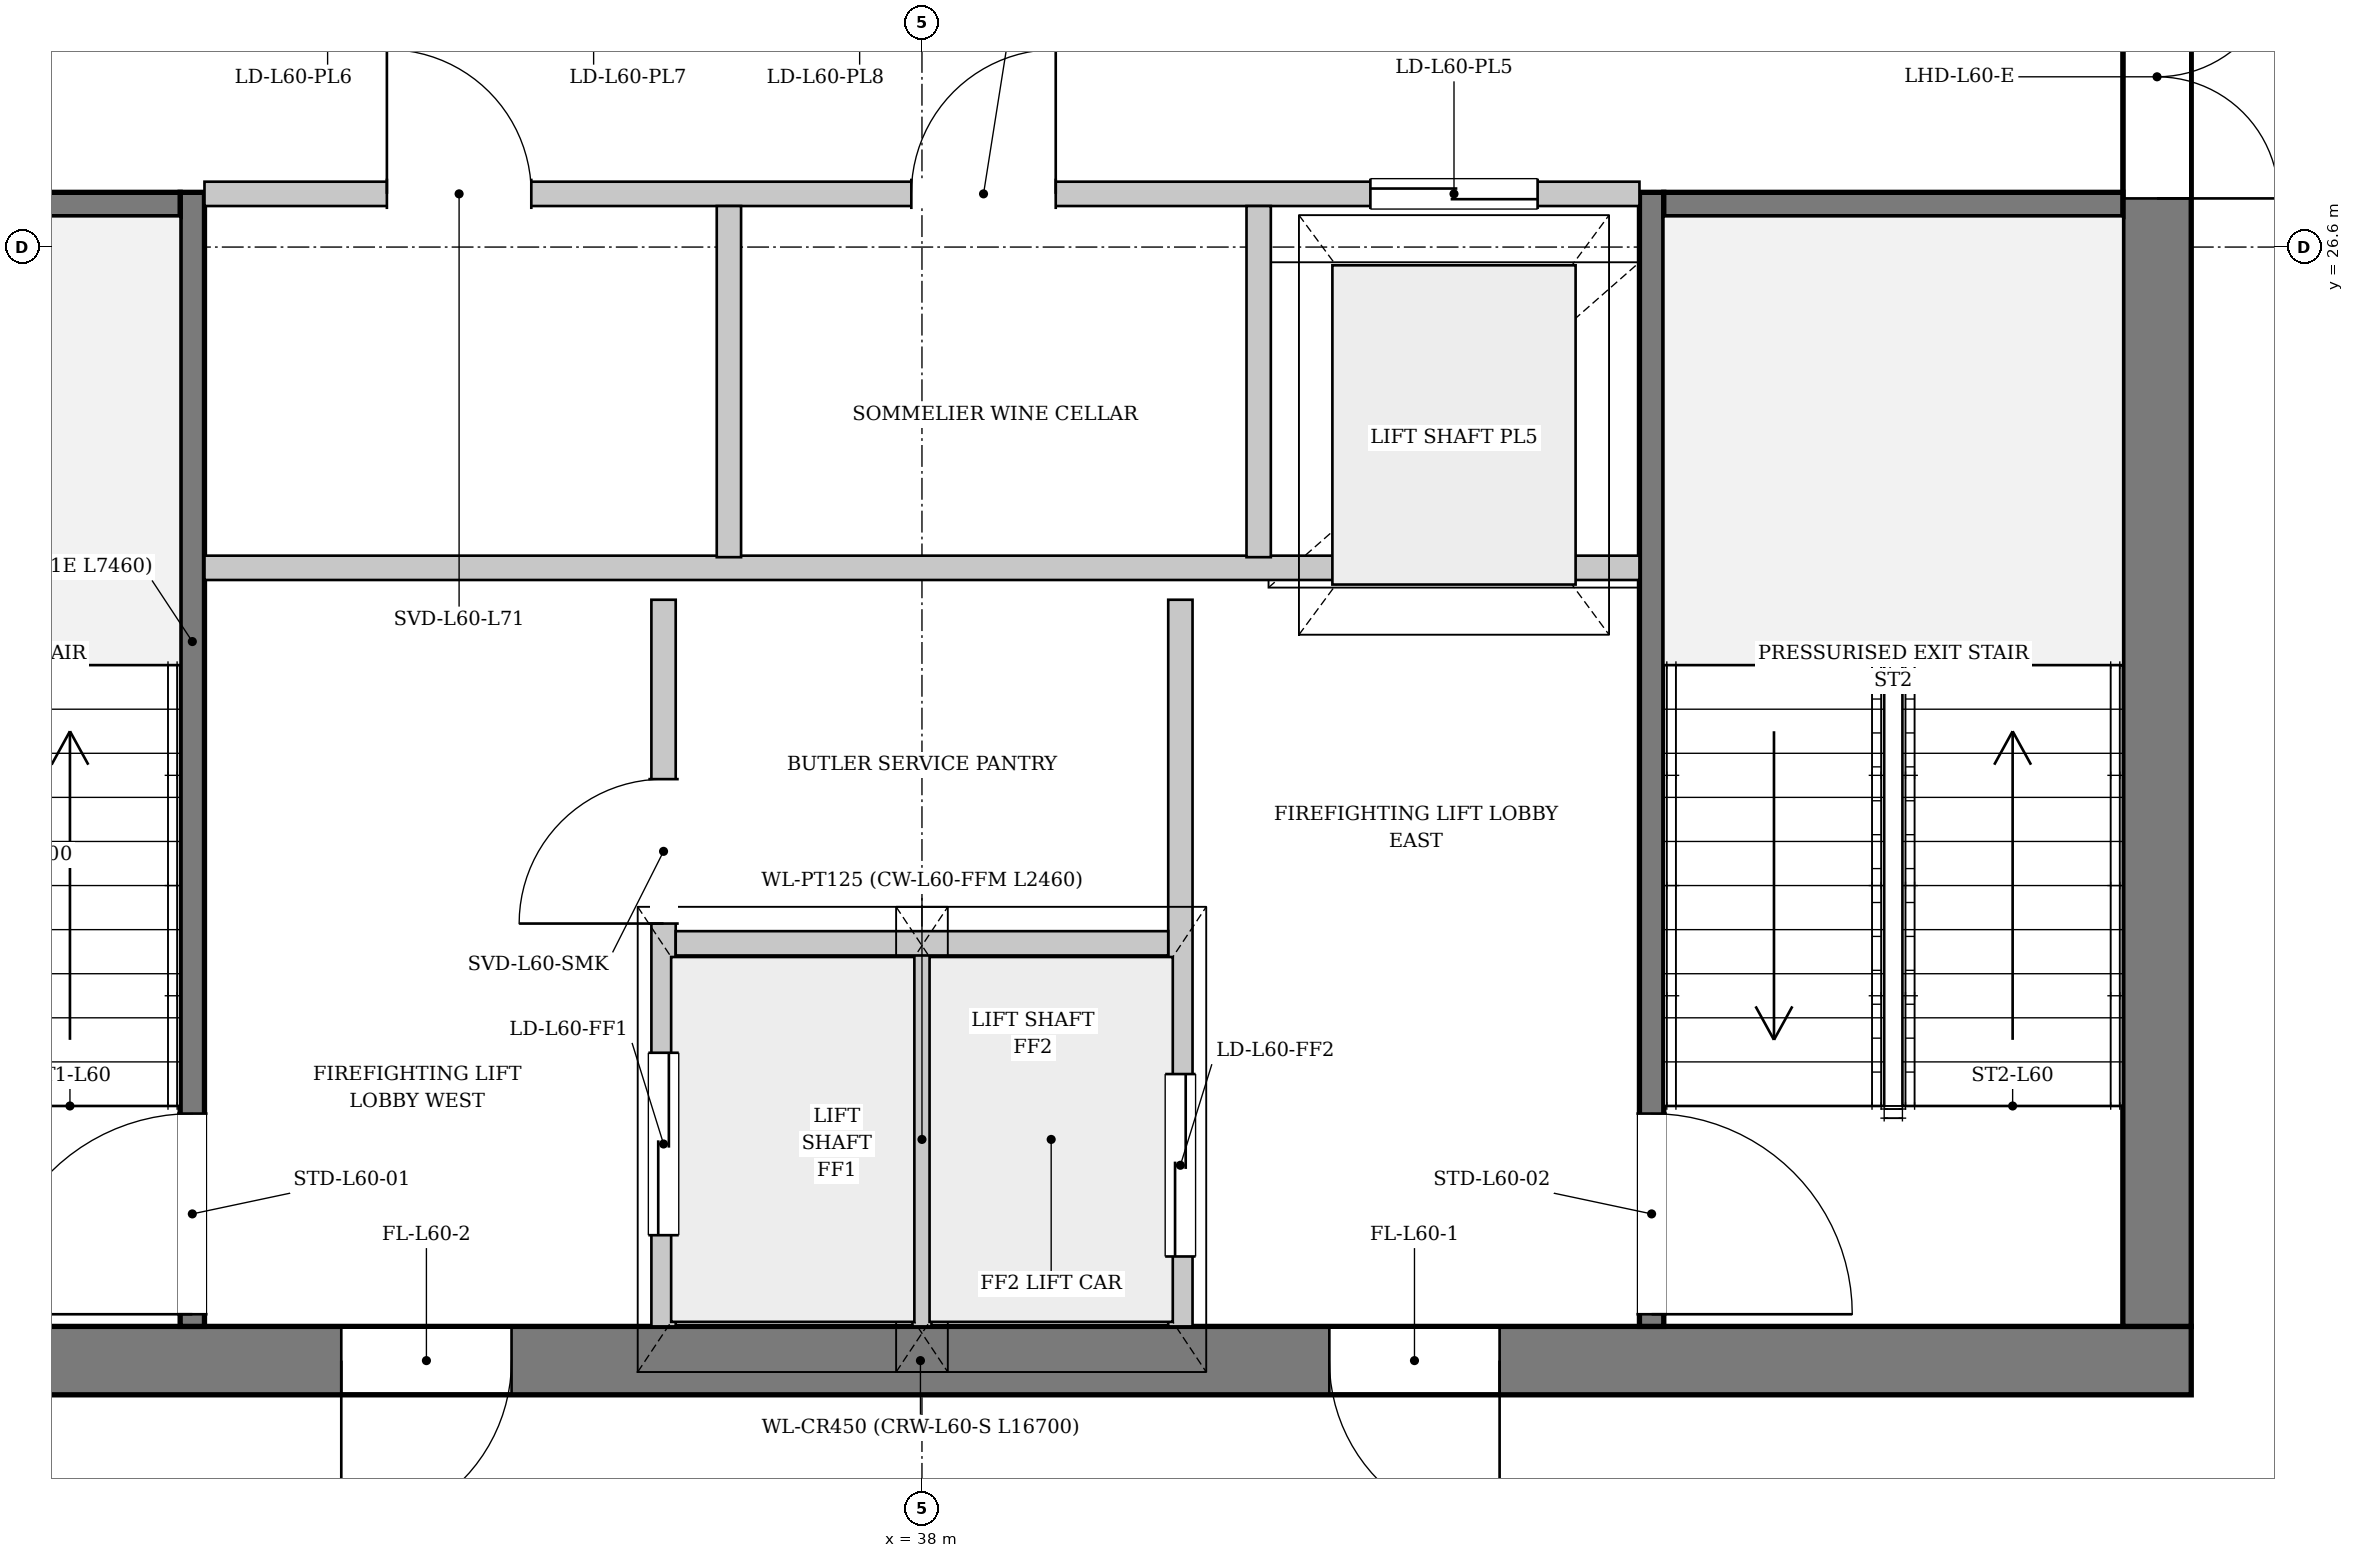
"""IFC4 building model, lengths in metres.
Left out: names, types, materials, properties, quantities, classifications, styles, units other than length and angle.
Written with IfcOpenShell. Run it as: python <this file> out.ifc"""

import sys

from ifc_helpers import new_model, si_unit, direction, frame, frame_2d, origin, place, context, subcontext, project, spatial, rectangle, extrude, source, transform, mapped, element, fill, save


model = new_model("IFC4")
c1 = context("Model", 3, precision=1e-05, world=origin(), true_north=direction((0.0, 1.0)))
c2 = subcontext(c1, "Body", "Model", "MODEL_VIEW")
j1 = project(units=[si_unit("LENGTHUNIT", "METRE"), si_unit("PLANEANGLEUNIT", "RADIAN")], contexts=[c1])
p1 = place(None, origin())
s1 = spatial("IfcSite", under=j1, at=p1, CompositionType="ELEMENT")
p2 = place(p1, origin())
s2 = spatial("IfcBuilding", under=s1, at=p2, CompositionType="ELEMENT")
p3 = place(p2, frame((0.0, 0.0, 227.35)))
s3 = spatial("IfcBuildingStorey", under=s2, at=p3, CompositionType="ELEMENT", Elevation=227.35)
p4 = place(p3, frame((52.76, 24.451, 0.0), z_axis=(0.0, 0.0, 1.0), x_axis=(-0.419378553641, -0.907811449997, 0.0)))
e1 = element("IfcWall", 1, at=p4, inside=s3, PredefinedType="SOLIDWALL", context=c2, shape_type="SweptSolid", body=[
    extrude(rectangle(XDim=22.952, YDim=0.32, at=frame_2d((11.476, 0.0))), origin(), (0.0, 0.0, 1.0), 2.822),
])
p5 = place(p4, frame((6.795, 0.0, 0.0)))
e2 = element("IfcOpeningElement", 2, at=p5, cuts=e1, PredefinedType="OPENING", context=c2, shape_type="SweptSolid", body=[
    extrude(rectangle(XDim=1.5, YDim=2.3, at=frame_2d((0.75, 1.15))), frame((0.0, 0.17, 0.0), z_axis=(0.0, -1.0, 0.0), x_axis=(1.0, 0.0, 0.0)), (0.0, 0.0, 1.0), 0.34),
])
p6 = place(p4, frame((17.285, 0.0, 0.352)))
e3 = element("IfcOpeningElement", 3, at=p6, cuts=e1, PredefinedType="OPENING", context=c2, shape_type="SweptSolid", body=[
    extrude(rectangle(XDim=2.6, YDim=2.35, at=frame_2d((1.3, 1.175))), frame((0.0, 0.17, 0.0), z_axis=(0.0, -1.0, 0.0), x_axis=(1.0, 0.0, 0.0)), (0.0, 0.0, 1.0), 0.34),
])
p7 = place(p3, frame((44.308, 3.919, 0.0), z_axis=(0.0, 0.0, 1.0), x_axis=(0.41441444949, 0.910088272671, 0.0)))
e4 = element("IfcWall", 4, at=p7, inside=s3, PredefinedType="PARAPET", context=c2, shape_type="SweptSolid", body=[
    extrude(rectangle(XDim=20.451, YDim=0.22, at=frame_2d((10.226, 0.0))), origin(), (0.0, 0.0, 1.0), 0.3),
])
p8 = place(p3, frame((46.35, 19.275, 0.0), z_axis=(0.0, 0.0, 1.0), x_axis=(-1.0, 0.0, 0.0)))
e5 = element("IfcWall", 5, at=p8, inside=s3, PredefinedType="SHEAR", context=c2, shape_type="SweptSolid", body=[
    extrude(rectangle(XDim=16.7, YDim=0.45, at=frame_2d((8.35, 0.0))), origin(), (0.0, 0.0, 1.0), 3.33),
])
p9 = place(p8, frame((4.55, 0.0, 0.0)))
e6 = element("IfcOpeningElement", 6, at=p9, cuts=e5, PredefinedType="OPENING", context=c2, shape_type="SweptSolid", body=[
    extrude(rectangle(XDim=1.12, YDim=2.25, at=frame_2d((0.56, 1.125))), frame((0.0, 0.235, 0.0), z_axis=(0.0, -1.0, 0.0), x_axis=(1.0, 0.0, 0.0)), (0.0, 0.0, 1.0), 0.47),
])
p10 = place(p8, frame((11.05, 0.0, 0.0)))
e7 = element("IfcOpeningElement", 7, at=p10, cuts=e5, PredefinedType="OPENING", context=c2, shape_type="SweptSolid", body=[
    extrude(rectangle(XDim=1.12, YDim=2.25, at=frame_2d((0.56, 1.125))), frame((0.0, 0.235, 0.0), z_axis=(0.0, -1.0, 0.0), x_axis=(1.0, 0.0, 0.0)), (0.0, 0.0, 1.0), 0.47),
])
p11 = place(p3, frame((46.125, 33.7, 0.0), z_axis=(0.0, 0.0, 1.0), x_axis=(0.0, -1.0, 0.0)))
e8 = element("IfcWall", 8, at=p11, inside=s3, PredefinedType="SHEAR", context=c2, shape_type="SweptSolid", body=[
    extrude(rectangle(XDim=14.2, YDim=0.45, at=frame_2d((7.1, 0.0))), origin(), (0.0, 0.0, 1.0), 3.33),
])
p12 = place(p11, frame((5.18, 0.0, 0.0)))
e9 = element("IfcOpeningElement", 9, at=p12, cuts=e8, PredefinedType="OPENING", context=c2, shape_type="SweptSolid", body=[
    extrude(rectangle(XDim=1.6, YDim=2.2, at=frame_2d((0.8, 1.1))), frame((0.0, 0.235, 0.0), z_axis=(0.0, -1.0, 0.0), x_axis=(1.0, 0.0, 0.0)), (0.0, 0.0, 1.0), 0.47),
])
p13 = place(p11, frame((2.05, 0.0, 0.0)))
e10 = element("IfcOpeningElement", 10, at=p13, cuts=e8, PredefinedType="OPENING", context=c2, shape_type="SweptSolid", body=[
    extrude(rectangle(XDim=0.95, YDim=2.1, at=frame_2d((0.475, 1.05))), frame((0.0, 0.235, 0.0), z_axis=(0.0, -1.0, 0.0), x_axis=(1.0, 0.0, 0.0)), (0.0, 0.0, 1.0), 0.47),
])
p14 = place(p3, frame((33.2, 19.5, 0.0), z_axis=(0.0, 0.0, 1.0), x_axis=(0.0, 1.0, 0.0)))
e11 = element("IfcWall", 11, at=p14, inside=s3, PredefinedType="PARTITIONING", context=c2, shape_type="SweptSolid", body=[
    extrude(rectangle(XDim=7.46, YDim=0.16, at=frame_2d((3.73, 0.0))), origin(), (0.0, 0.0, 1.0), 3.33),
])
p15 = place(p14, frame((0.08, 0.0, 0.0)))
e12 = element("IfcOpeningElement", 12, at=p15, cuts=e11, PredefinedType="OPENING", context=c2, shape_type="SweptSolid", body=[
    extrude(rectangle(XDim=1.32, YDim=2.2, at=frame_2d((0.66, 1.1))), frame((0.0, 0.09, 0.0), z_axis=(0.0, -1.0, 0.0), x_axis=(1.0, 0.0, 0.0)), (0.0, 0.0, 1.0), 0.18),
])
p16 = place(p3, frame((30.1, 26.88, 0.0), z_axis=(0.0, 0.0, 1.0), x_axis=(1.0, 0.0, 0.0)))
e13 = element("IfcWall", 13, at=p16, inside=s3, PredefinedType="PARTITIONING", context=c2, shape_type="SweptSolid", body=[
    extrude(rectangle(XDim=3.02, YDim=0.16, at=frame_2d((1.51, 0.0))), origin(), (0.0, 0.0, 1.0), 3.33),
])
p17 = place(p3, frame((42.8, 26.96, 0.0), z_axis=(0.0, 0.0, 1.0), x_axis=(0.0, -1.0, 0.0)))
e14 = element("IfcWall", 14, at=p17, inside=s3, PredefinedType="PARTITIONING", context=c2, shape_type="SweptSolid", body=[
    extrude(rectangle(XDim=7.46, YDim=0.16, at=frame_2d((3.73, 0.0))), origin(), (0.0, 0.0, 1.0), 3.33),
])
p18 = place(p17, frame((6.06, 0.0, 0.0)))
e15 = element("IfcOpeningElement", 15, at=p18, cuts=e14, PredefinedType="OPENING", context=c2, shape_type="SweptSolid", body=[
    extrude(rectangle(XDim=1.32, YDim=2.2, at=frame_2d((0.66, 1.1))), frame((0.0, 0.09, 0.0), z_axis=(0.0, -1.0, 0.0), x_axis=(1.0, 0.0, 0.0)), (0.0, 0.0, 1.0), 0.18),
])
p19 = place(p3, frame((42.88, 26.88, 0.0), z_axis=(0.0, 0.0, 1.0), x_axis=(1.0, 0.0, 0.0)))
e16 = element("IfcWall", 16, at=p19, inside=s3, PredefinedType="PARTITIONING", context=c2, shape_type="SweptSolid", body=[
    extrude(rectangle(XDim=3.02, YDim=0.16, at=frame_2d((1.51, 0.0))), origin(), (0.0, 0.0, 1.0), 3.33),
])
p20 = place(p3, frame((36.3, 19.5, 0.0), z_axis=(0.0, 0.0, 1.0), x_axis=(0.0, 1.0, 0.0)))
e17 = element("IfcWall", 17, at=p20, inside=s3, PredefinedType="PARTITIONING", context=c2, shape_type="SweptSolid", body=[
    extrude(rectangle(XDim=4.78, YDim=0.16, at=frame_2d((2.39, 0.0))), origin(), (0.0, 0.0, 1.0), 3.33),
])
p21 = place(p20, frame((0.6, 0.0, 0.0)))
e18 = element("IfcOpeningElement", 18, at=p21, cuts=e17, PredefinedType="OPENING", context=c2, shape_type="SweptSolid", body=[
    extrude(rectangle(XDim=1.2, YDim=2.2, at=frame_2d((0.6, 1.1))), frame((0.0, 0.09, 0.0), z_axis=(0.0, -1.0, 0.0), x_axis=(1.0, 0.0, 0.0)), (0.0, 0.0, 1.0), 0.18),
])
p22 = place(p20, frame((2.65, 0.0, 0.0)))
e19 = element("IfcOpeningElement", 19, at=p22, cuts=e17, PredefinedType="OPENING", context=c2, shape_type="SweptSolid", body=[
    extrude(rectangle(XDim=0.95, YDim=2.1, at=frame_2d((0.475, 1.05))), frame((0.0, 0.09, 0.0), z_axis=(0.0, -1.0, 0.0), x_axis=(1.0, 0.0, 0.0)), (0.0, 0.0, 1.0), 0.18),
])
p23 = place(p3, frame((39.7, 24.28, 0.0), z_axis=(0.0, 0.0, 1.0), x_axis=(0.0, -1.0, 0.0)))
e20 = element("IfcWall", 20, at=p23, inside=s3, PredefinedType="PARTITIONING", context=c2, shape_type="SweptSolid", body=[
    extrude(rectangle(XDim=4.78, YDim=0.16, at=frame_2d((2.39, 0.0))), origin(), (0.0, 0.0, 1.0), 3.33),
])
p24 = place(p23, frame((3.12, 0.0, 0.0)))
e21 = element("IfcOpeningElement", 21, at=p24, cuts=e20, PredefinedType="OPENING", context=c2, shape_type="SweptSolid", body=[
    extrude(rectangle(XDim=1.2, YDim=2.2, at=frame_2d((0.6, 1.1))), frame((0.0, 0.09, 0.0), z_axis=(0.0, -1.0, 0.0), x_axis=(1.0, 0.0, 0.0)), (0.0, 0.0, 1.0), 0.18),
])
p25 = place(p3, frame((38.0, 19.5, 0.0), z_axis=(0.0, 0.0, 1.0), x_axis=(0.0, 1.0, 0.0)))
e22 = element("IfcWall", 22, at=p25, inside=s3, PredefinedType="PARTITIONING", context=c2, shape_type="SweptSolid", body=[
    extrude(rectangle(XDim=2.46, YDim=0.125, at=frame_2d((1.23, 0.0))), origin(), (0.0, 0.0, 1.0), 3.33),
])
p26 = place(p3, frame((36.38, 22.02, 0.0), z_axis=(0.0, 0.0, 1.0), x_axis=(1.0, 0.0, 0.0)))
e23 = element("IfcWall", 23, at=p26, inside=s3, PredefinedType="PARTITIONING", context=c2, shape_type="SweptSolid", body=[
    extrude(rectangle(XDim=3.24, YDim=0.16, at=frame_2d((1.62, 0.0))), origin(), (0.0, 0.0, 1.0), 3.33),
])
p27 = place(p3, frame((33.28, 24.49, 0.0), z_axis=(0.0, 0.0, 1.0), x_axis=(1.0, 0.0, 0.0)))
e24 = element("IfcWall", 24, at=p27, inside=s3, PredefinedType="PARTITIONING", context=c2, shape_type="SweptSolid", body=[
    extrude(rectangle(XDim=9.44, YDim=0.16, at=frame_2d((4.72, 0.0))), origin(), (0.0, 0.0, 1.0), 3.33),
])
p28 = place(p3, frame((33.28, 26.95, 0.0), z_axis=(0.0, 0.0, 1.0), x_axis=(1.0, 0.0, 0.0)))
e25 = element("IfcWall", 25, at=p28, inside=s3, PredefinedType="PARTITIONING", context=c2, shape_type="SweptSolid", body=[
    extrude(rectangle(XDim=9.44, YDim=0.16, at=frame_2d((4.72, 0.0))), origin(), (0.0, 0.0, 1.0), 3.33),
])
p29 = place(p28, frame((1.2, 0.0, 0.0)))
e26 = element("IfcOpeningElement", 26, at=p29, cuts=e25, PredefinedType="OPENING", context=c2, shape_type="SweptSolid", body=[
    extrude(rectangle(XDim=0.95, YDim=2.1, at=frame_2d((0.475, 1.05))), frame((0.0, 0.09, 0.0), z_axis=(0.0, -1.0, 0.0), x_axis=(1.0, 0.0, 0.0)), (0.0, 0.0, 1.0), 0.18),
])
p30 = place(p28, frame((4.65, 0.0, 0.0)))
e27 = element("IfcOpeningElement", 27, at=p30, cuts=e25, PredefinedType="OPENING", context=c2, shape_type="SweptSolid", body=[
    extrude(rectangle(XDim=0.95, YDim=2.1, at=frame_2d((0.475, 1.05))), frame((0.0, 0.09, 0.0), z_axis=(0.0, -1.0, 0.0), x_axis=(1.0, 0.0, 0.0)), (0.0, 0.0, 1.0), 0.18),
])
p31 = place(p28, frame((7.67, 0.0, 0.0)))
e28 = element("IfcOpeningElement", 28, at=p31, cuts=e25, PredefinedType="OPENING", context=c2, shape_type="SweptSolid", body=[
    extrude(rectangle(XDim=1.1, YDim=2.2, at=frame_2d((0.55, 1.1))), frame((0.0, 0.09, 0.0), z_axis=(0.0, -1.0, 0.0), x_axis=(1.0, 0.0, 0.0)), (0.0, 0.0, 1.0), 0.18),
])
for number, where, z_axis, x_axis in (
    (29, (36.73, 24.56, 0.0), (0.0, 0.0, 1.0), (0.0, 1.0, 0.0)),
    (30, (40.215, 24.56, 0.0), (0.0, 0.0, 1.0), (0.0, 1.0, 0.0)),
):
    element("IfcWall", number, at=place(p3, frame(where, z_axis=z_axis, x_axis=x_axis)), inside=s3, PredefinedType="PARTITIONING", context=c2, shape_type="SweptSolid", body=[
        extrude(rectangle(XDim=2.31, YDim=0.16, at=frame_2d((1.155, 0.0))), origin(), (0.0, 0.0, 1.0), 3.33),
    ])
m1 = source(origin(), c2, "Body", "SweptSolid", [
    extrude(rectangle(XDim=1.12, YDim=2.25, at=frame_2d((0.56, 1.125))), frame((0.0, 0.025, 0.0), z_axis=(0.0, -1.0, 0.0), x_axis=(1.0, 0.0, 0.0)), (0.0, 0.0, 1.0), 0.05),
])
p32 = place(p9, origin())
e31 = element("IfcDoor", 31, at=p32, inside=s3, OperationType="SINGLE_SWING_LEFT", PredefinedType="DOOR", context=c2, shape_type="MappedRepresentation", body=[
    mapped(m1, transform((0.0, 0.0, 0.0), x_axis=(1.0, 0.0, 0.0), y_axis=(0.0, 1.0, 0.0), z_axis=(0.0, 0.0, 1.0), scale=1.0)),
])
fill(e6, e31)
p33 = place(p10, origin())
e32 = element("IfcDoor", 32, at=p33, inside=s3, OperationType="SINGLE_SWING_RIGHT", PredefinedType="DOOR", context=c2, shape_type="MappedRepresentation", body=[
    mapped(m1, transform((0.0, 0.0, 0.0), x_axis=(1.0, 0.0, 0.0), y_axis=(0.0, 1.0, 0.0), z_axis=(0.0, 0.0, 1.0), scale=1.0)),
])
fill(e7, e32)
m2 = source(origin(), c2, "Body", "SweptSolid", [
    extrude(rectangle(XDim=1.6, YDim=2.2, at=frame_2d((0.8, 1.1))), frame((0.0, 0.025, 0.0), z_axis=(0.0, -1.0, 0.0), x_axis=(1.0, 0.0, 0.0)), (0.0, 0.0, 1.0), 0.05),
])
p34 = place(p12, origin())
e33 = element("IfcDoor", 33, at=p34, inside=s3, OperationType="DOUBLE_DOOR_SINGLE_SWING", PredefinedType="DOOR", context=c2, shape_type="MappedRepresentation", body=[
    mapped(m2, transform((0.0, 0.0, 0.0), x_axis=(1.0, 0.0, 0.0), y_axis=(0.0, 1.0, 0.0), z_axis=(0.0, 0.0, 1.0), scale=1.0)),
])
fill(e9, e33)
m3 = source(origin(), c2, "Body", "SweptSolid", [
    extrude(rectangle(XDim=1.32, YDim=2.2, at=frame_2d((0.66, 1.1))), frame((0.0, 0.025, 0.0), z_axis=(0.0, -1.0, 0.0), x_axis=(1.0, 0.0, 0.0)), (0.0, 0.0, 1.0), 0.05),
])
p35 = place(p15, origin())
e34 = element("IfcDoor", 34, at=p35, inside=s3, OperationType="SINGLE_SWING_LEFT", PredefinedType="DOOR", context=c2, shape_type="MappedRepresentation", body=[
    mapped(m3, transform((0.0, 0.0, 0.0), x_axis=(1.0, 0.0, 0.0), y_axis=(0.0, 1.0, 0.0), z_axis=(0.0, 0.0, 1.0), scale=1.0)),
])
fill(e12, e34)
p36 = place(p18, origin())
e35 = element("IfcDoor", 35, at=p36, inside=s3, OperationType="SINGLE_SWING_RIGHT", PredefinedType="DOOR", context=c2, shape_type="MappedRepresentation", body=[
    mapped(m3, transform((0.0, 0.0, 0.0), x_axis=(1.0, 0.0, 0.0), y_axis=(0.0, 1.0, 0.0), z_axis=(0.0, 0.0, 1.0), scale=1.0)),
])
fill(e15, e35)
m4 = source(origin(), c2, "Body", "SweptSolid", [
    extrude(rectangle(XDim=1.2, YDim=2.2, at=frame_2d((0.6, 1.1))), frame((0.0, 0.025, 0.0), z_axis=(0.0, -1.0, 0.0), x_axis=(1.0, 0.0, 0.0)), (0.0, 0.0, 1.0), 0.05),
])
p37 = place(p21, origin())
e36 = element("IfcDoor", 36, at=p37, inside=s3, OperationType="DOUBLE_DOOR_SLIDING", PredefinedType="DOOR", context=c2, shape_type="MappedRepresentation", body=[
    mapped(m4, transform((0.0, 0.0, 0.0), x_axis=(1.0, 0.0, 0.0), y_axis=(0.0, 1.0, 0.0), z_axis=(0.0, 0.0, 1.0), scale=1.0)),
])
fill(e18, e36)
m5 = source(origin(), c2, "Body", "SweptSolid", [
    extrude(rectangle(XDim=0.95, YDim=2.1, at=frame_2d((0.475, 1.05))), frame((0.0, 0.025, 0.0), z_axis=(0.0, -1.0, 0.0), x_axis=(1.0, 0.0, 0.0)), (0.0, 0.0, 1.0), 0.05),
])
p38 = place(p22, origin())
e37 = element("IfcDoor", 37, at=p38, inside=s3, OperationType="SINGLE_SWING_LEFT", PredefinedType="DOOR", context=c2, shape_type="MappedRepresentation", body=[
    mapped(m5, transform((0.0, 0.0, 0.0), x_axis=(1.0, 0.0, 0.0), y_axis=(0.0, 1.0, 0.0), z_axis=(0.0, 0.0, 1.0), scale=1.0)),
])
fill(e19, e37)
p39 = place(p24, origin())
e38 = element("IfcDoor", 38, at=p39, inside=s3, OperationType="DOUBLE_DOOR_SLIDING", PredefinedType="DOOR", context=c2, shape_type="MappedRepresentation", body=[
    mapped(m4, transform((0.0, 0.0, 0.0), x_axis=(1.0, 0.0, 0.0), y_axis=(0.0, 1.0, 0.0), z_axis=(0.0, 0.0, 1.0), scale=1.0)),
])
fill(e21, e38)
p40 = place(p29, origin())
e39 = element("IfcDoor", 39, at=p40, inside=s3, OperationType="SINGLE_SWING_LEFT", PredefinedType="DOOR", context=c2, shape_type="MappedRepresentation", body=[
    mapped(m5, transform((0.0, 0.0, 0.0), x_axis=(1.0, 0.0, 0.0), y_axis=(0.0, 1.0, 0.0), z_axis=(0.0, 0.0, 1.0), scale=1.0)),
])
fill(e26, e39)
p41 = place(p30, origin())
e40 = element("IfcDoor", 40, at=p41, inside=s3, OperationType="SINGLE_SWING_RIGHT", PredefinedType="DOOR", context=c2, shape_type="MappedRepresentation", body=[
    mapped(m5, transform((0.0, 0.0, 0.0), x_axis=(1.0, 0.0, 0.0), y_axis=(0.0, 1.0, 0.0), z_axis=(0.0, 0.0, 1.0), scale=1.0)),
])
fill(e27, e40)
m6 = source(origin(), c2, "Body", "SweptSolid", [
    extrude(rectangle(XDim=1.1, YDim=2.2, at=frame_2d((0.55, 1.1))), frame((0.0, 0.025, 0.0), z_axis=(0.0, -1.0, 0.0), x_axis=(1.0, 0.0, 0.0)), (0.0, 0.0, 1.0), 0.05),
])
p42 = place(p31, origin())
e41 = element("IfcDoor", 41, at=p42, inside=s3, OperationType="DOUBLE_DOOR_SLIDING", PredefinedType="DOOR", context=c2, shape_type="MappedRepresentation", body=[
    mapped(m6, transform((0.0, 0.0, 0.0), x_axis=(1.0, 0.0, 0.0), y_axis=(0.0, 1.0, 0.0), z_axis=(0.0, 0.0, 1.0), scale=1.0)),
])
fill(e28, e41)
save(model, sys.argv[1])
